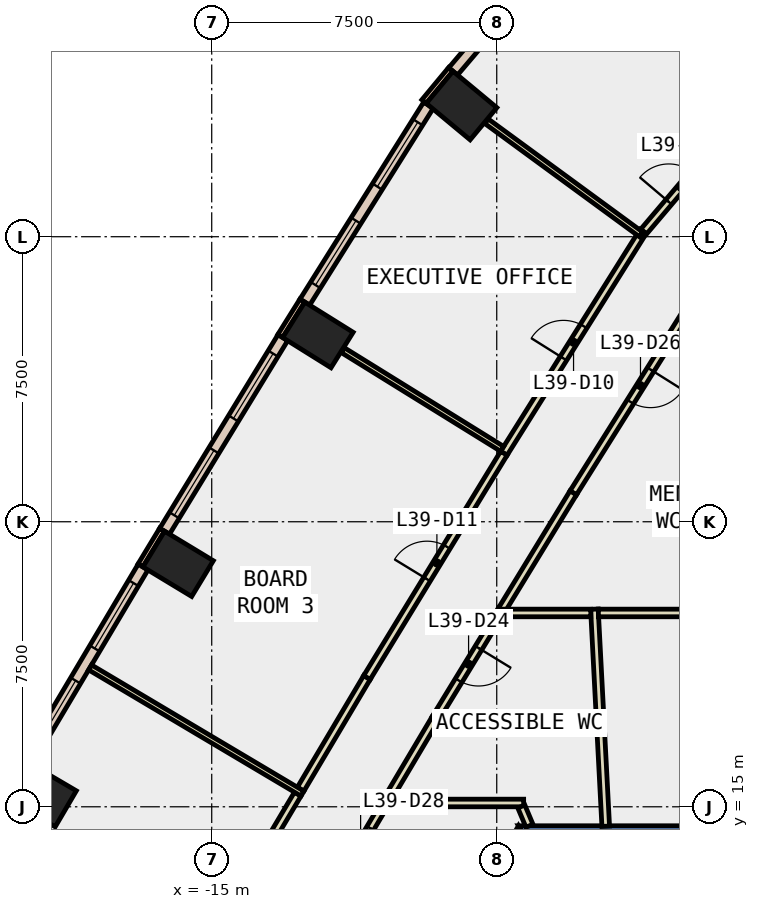
"""IFC4 building model, lengths in metres.
Left out: names, types, materials, properties, quantities, classifications, styles, units other than length and angle.
Written with IfcOpenShell. Run it as: python <this file> out.ifc"""

import sys

from ifc_helpers import new_model, si_unit, direction, frame, frame_2d, origin, origin_2d, place, context, subcontext, project, spatial, polyline, rectangle, outline, extrude, element, fill, save


model = new_model("IFC4")
c1 = context("Model", 3, precision=1e-05, world=origin(), true_north=direction((0.0, 1.0)))
c2 = subcontext(c1, "Body", "Model", "MODEL_VIEW")
j1 = project(units=[si_unit("LENGTHUNIT", "METRE"), si_unit("PLANEANGLEUNIT", "RADIAN")], contexts=[c1])
p1 = place(None, origin())
s1 = spatial("IfcSite", under=j1, at=p1, CompositionType="ELEMENT")
p2 = place(p1, origin())
s2 = spatial("IfcBuilding", under=s1, at=p2, CompositionType="ELEMENT")
p3 = place(p2, frame((0.0, 0.0, 176.0)))
s3 = spatial("IfcBuildingStorey", under=s2, at=p3, CompositionType="ELEMENT", Elevation=176.0)
for number, where, z_axis, x_axis in (
    (1, (-8.426, 33.452, -0.4), (0.0, 0.0, 1.0), (0.639, 0.769, 0.0)),
    (2, (-12.206, 27.416, -0.4), (0.0, 0.0, 1.0), (0.53, 0.848, 0.0)),
    (3, (-15.884, 21.393, -0.4), (0.0, 0.0, 1.0), (0.518, 0.855, 0.0)),
    (4, (-19.488, 15.326, -0.4), (0.0, 0.0, 1.0), (0.506, 0.863, 0.0)),
):
    element("IfcColumn", number, at=place(p3, frame(where, z_axis=z_axis, x_axis=x_axis)), inside=s3, PredefinedType="COLUMN", context=c2, shape_type="SweptSolid", body=[
        extrude(rectangle(XDim=1.1, YDim=1.5, at=origin_2d()), origin(), (0.0, 0.0, 1.0), 4.2),
    ])
p4 = place(p3, frame((0.0, 0.0, -0.4)))
e5 = element("IfcWall", 5, at=p4, inside=s3, PredefinedType="SHEAR", context=c2, shape_type="SweptSolid", body=[
    extrude(outline(polyline([(6.928, 14.5), (-6.928, 14.5), (-6.351, 13.5), (6.351, 13.5), (6.928, 14.5)])), origin(), (0.0, 0.0, 1.0), 4.2),
])
p5 = place(p3, frame((0.0, 0.0, -0.4)))
e6 = element("IfcWall", 6, at=p5, inside=s3, PredefinedType="SHEAR", context=c2, shape_type="SweptSolid", body=[
    extrude(outline(polyline([(-12.267, 5.252), (-11.402, 4.752), (-6.351, 13.5), (-6.928, 14.5), (-12.267, 5.252)])), origin(), (0.0, 0.0, 1.0), 4.2),
])
p6 = place(p3, frame((-8.709, 34.402, 0.0), z_axis=(0.0, 0.0, 1.0), x_axis=(-0.639092407347, -0.769129959676, 0.0)))
e7 = element("IfcWall", 7, at=p6, inside=s3, PredefinedType="STANDARD", context=c2, shape_type="SweptSolid", body=[
    extrude(rectangle(XDim=1.1, YDim=0.15, at=frame_2d((0.55, 0.0))), origin(), (0.0, 0.0, 1.0), 3.8),
])
p7 = place(p3, frame((-12.614, 28.32, 0.0), z_axis=(0.0, 0.0, 1.0), x_axis=(-0.529879262372, -0.848073090782, 0.0)))
e8 = element("IfcWall", 8, at=p7, inside=s3, PredefinedType="STANDARD", context=c2, shape_type="SweptSolid", body=[
    extrude(rectangle(XDim=1.1, YDim=0.15, at=frame_2d((0.55, 0.0))), origin(), (0.0, 0.0, 1.0), 3.8),
])
p8 = place(p3, frame((-16.305, 22.291, 0.0), z_axis=(0.0, 0.0, 1.0), x_axis=(-0.518178754102, -0.855272341888, 0.0)))
e9 = element("IfcWall", 9, at=p8, inside=s3, PredefinedType="STANDARD", context=c2, shape_type="SweptSolid", body=[
    extrude(rectangle(XDim=1.1, YDim=0.15, at=frame_2d((0.55, 0.0))), origin(), (0.0, 0.0, 1.0), 3.8),
])
p9 = place(p3, frame((-5.889, 37.599, 0.0), z_axis=(0.0, 0.0, 1.0), x_axis=(-0.647156077277, -0.76235753531, 0.0)))
e10 = element("IfcWall", 10, at=p9, inside=s3, PredefinedType="STANDARD", context=c2, shape_type="SweptSolid", body=[
    extrude(rectangle(XDim=4.262, YDim=0.3, at=frame_2d((2.131, 0.0))), origin(), (0.0, 0.0, 1.0), 3.8),
])
p10 = place(p9, frame((1.431, 0.0, 0.9)))
e11 = element("IfcOpeningElement", 11, at=p10, cuts=e10, PredefinedType="OPENING", context=c2, shape_type="SweptSolid", body=[
    extrude(rectangle(XDim=1.4, YDim=2.6, at=frame_2d((0.7, 1.3))), frame((0.0, 0.16, 0.0), z_axis=(0.0, -1.0, 0.0), x_axis=(1.0, 0.0, 0.0)), (0.0, 0.0, 1.0), 0.32),
])
p11 = place(p3, frame((-9.296, 33.461, 0.0), z_axis=(0.0, 0.0, 1.0), x_axis=(-0.531816047834, -0.846859900613, 0.0)))
e12 = element("IfcWall", 12, at=p11, inside=s3, PredefinedType="STANDARD", context=c2, shape_type="SweptSolid", body=[
    extrude(rectangle(XDim=6.119, YDim=0.3, at=frame_2d((3.06, 0.0))), origin(), (0.0, 0.0, 1.0), 3.8),
])
p12 = place(p11, frame((0.53, 0.0, 0.9)))
e13 = element("IfcOpeningElement", 13, at=p12, cuts=e12, PredefinedType="OPENING", context=c2, shape_type="SweptSolid", body=[
    extrude(rectangle(XDim=2.0, YDim=2.6, at=frame_2d((1.0, 1.3))), frame((0.0, 0.16, 0.0), z_axis=(0.0, -1.0, 0.0), x_axis=(1.0, 0.0, 0.0)), (0.0, 0.0, 1.0), 0.32),
])
p13 = place(p11, frame((3.589, 0.0, 0.9)))
e14 = element("IfcOpeningElement", 14, at=p13, cuts=e12, PredefinedType="OPENING", context=c2, shape_type="SweptSolid", body=[
    extrude(rectangle(XDim=2.0, YDim=2.6, at=frame_2d((1.0, 1.3))), frame((0.0, 0.16, 0.0), z_axis=(0.0, -1.0, 0.0), x_axis=(1.0, 0.0, 0.0)), (0.0, 0.0, 1.0), 0.32),
])
p14 = place(p3, frame((-13.128, 27.345, 0.0), z_axis=(0.0, 0.0, 1.0), x_axis=(-0.521263083766, -0.8533960379, 0.0)))
e15 = element("IfcWall", 15, at=p14, inside=s3, PredefinedType="STANDARD", context=c2, shape_type="SweptSolid", body=[
    extrude(rectangle(XDim=5.97, YDim=0.3, at=frame_2d((2.985, 0.0))), origin(), (0.0, 0.0, 1.0), 3.8),
])
p15 = place(p14, frame((0.493, 0.0, 0.9)))
e16 = element("IfcOpeningElement", 16, at=p15, cuts=e15, PredefinedType="OPENING", context=c2, shape_type="SweptSolid", body=[
    extrude(rectangle(XDim=2.0, YDim=2.6, at=frame_2d((1.0, 1.3))), frame((0.0, 0.16, 0.0), z_axis=(0.0, -1.0, 0.0), x_axis=(1.0, 0.0, 0.0)), (0.0, 0.0, 1.0), 0.32),
])
p16 = place(p14, frame((3.478, 0.0, 0.9)))
e17 = element("IfcOpeningElement", 17, at=p16, cuts=e15, PredefinedType="OPENING", context=c2, shape_type="SweptSolid", body=[
    extrude(rectangle(XDim=2.0, YDim=2.6, at=frame_2d((1.0, 1.3))), frame((0.0, 0.16, 0.0), z_axis=(0.0, -1.0, 0.0), x_axis=(1.0, 0.0, 0.0)), (0.0, 0.0, 1.0), 0.32),
])
p17 = place(p3, frame((-16.806, 21.309, 0.0), z_axis=(0.0, 0.0, 1.0), x_axis=(-0.510653096173, -0.859786842984, 0.0)))
e18 = element("IfcWall", 18, at=p17, inside=s3, PredefinedType="STANDARD", context=c2, shape_type="SweptSolid", body=[
    extrude(rectangle(XDim=5.969, YDim=0.3, at=frame_2d((2.984, 0.0))), origin(), (0.0, 0.0, 1.0), 3.8),
])
p18 = place(p17, frame((0.492, 0.0, 0.9)))
e19 = element("IfcOpeningElement", 19, at=p18, cuts=e18, PredefinedType="OPENING", context=c2, shape_type="SweptSolid", body=[
    extrude(rectangle(XDim=2.0, YDim=2.6, at=frame_2d((1.0, 1.3))), frame((0.0, 0.16, 0.0), z_axis=(0.0, -1.0, 0.0), x_axis=(1.0, 0.0, 0.0)), (0.0, 0.0, 1.0), 0.32),
])
p19 = place(p17, frame((3.477, 0.0, 0.9)))
e20 = element("IfcOpeningElement", 20, at=p19, cuts=e18, PredefinedType="OPENING", context=c2, shape_type="SweptSolid", body=[
    extrude(rectangle(XDim=2.0, YDim=2.6, at=frame_2d((1.0, 1.3))), frame((0.0, 0.16, 0.0), z_axis=(0.0, -1.0, 0.0), x_axis=(1.0, 0.0, 0.0)), (0.0, 0.0, 1.0), 0.32),
])
p20 = place(p3, frame((-10.484, 15.014, 0.0), z_axis=(0.0, 0.0, 1.0), x_axis=(-0.510627855782, -0.859801833506, 0.0)))
e21 = element("IfcWall", 21, at=p20, inside=s3, PredefinedType="PARTITIONING", context=c2, shape_type="SweptSolid", body=[
    extrude(rectangle(XDim=2.342, YDim=0.2, at=frame_2d((1.171, 0.0))), origin(), (0.0, 0.0, 1.0), 3.75),
])
p21 = place(p20, frame((0.671, 0.0, 0.0)))
e22 = element("IfcOpeningElement", 22, at=p21, cuts=e21, PredefinedType="OPENING", context=c2, shape_type="SweptSolid", body=[
    extrude(rectangle(XDim=1.0, YDim=2.1, at=frame_2d((0.5, 1.05))), frame((0.0, 0.11, 0.0), z_axis=(0.0, -1.0, 0.0), x_axis=(1.0, 0.0, 0.0)), (0.0, 0.0, 1.0), 0.22),
])
p22 = place(p3, frame((-7.365, 20.185, 0.0), z_axis=(0.0, 0.0, 1.0), x_axis=(-0.521352973407, -0.853341125881, 0.0)))
e23 = element("IfcWall", 23, at=p22, inside=s3, PredefinedType="PARTITIONING", context=c2, shape_type="SweptSolid", body=[
    extrude(rectangle(XDim=3.359, YDim=0.2, at=frame_2d((1.679, 0.0))), origin(), (0.0, 0.0, 1.0), 3.75),
])
p23 = place(p22, frame((1.18, 0.0, 0.0)))
e24 = element("IfcOpeningElement", 24, at=p23, cuts=e23, PredefinedType="OPENING", context=c2, shape_type="SweptSolid", body=[
    extrude(rectangle(XDim=1.0, YDim=2.1, at=frame_2d((0.5, 1.05))), frame((0.0, 0.11, 0.0), z_axis=(0.0, -1.0, 0.0), x_axis=(1.0, 0.0, 0.0)), (0.0, 0.0, 1.0), 0.22),
])
p24 = place(p3, frame((-9.116, 17.319, 0.0), z_axis=(0.0, 0.0, 1.0), x_axis=(-0.510422773569, -0.859923596735, 0.0)))
e25 = element("IfcWall", 25, at=p24, inside=s3, PredefinedType="PARTITIONING", context=c2, shape_type="SweptSolid", body=[
    extrude(rectangle(XDim=2.48, YDim=0.2, at=frame_2d((1.24, 0.0))), origin(), (0.0, 0.0, 1.0), 3.75),
])
p25 = place(p3, frame((-1.948, 28.898, 0.0), z_axis=(0.0, 0.0, 1.0), x_axis=(-0.531656179122, -0.846960274866, 0.0)))
e26 = element("IfcWall", 26, at=p25, inside=s3, PredefinedType="PARTITIONING", context=c2, shape_type="SweptSolid", body=[
    extrude(rectangle(XDim=6.657, YDim=0.2, at=frame_2d((3.328, 0.0))), origin(), (0.0, 0.0, 1.0), 3.75),
])
p26 = place(p25, frame((2.828, 0.0, 0.0)))
e27 = element("IfcOpeningElement", 27, at=p26, cuts=e26, PredefinedType="OPENING", context=c2, shape_type="SweptSolid", body=[
    extrude(rectangle(XDim=1.0, YDim=2.1, at=frame_2d((0.5, 1.05))), frame((0.0, 0.11, 0.0), z_axis=(0.0, -1.0, 0.0), x_axis=(1.0, 0.0, 0.0)), (0.0, 0.0, 1.0), 0.22),
])
p27 = place(p3, frame((-5.487, 23.26, 0.0), z_axis=(0.0, 0.0, 1.0), x_axis=(-0.521206053955, -0.853430869679, 0.0)))
e28 = element("IfcWall", 28, at=p27, inside=s3, PredefinedType="PARTITIONING", context=c2, shape_type="SweptSolid", body=[
    extrude(rectangle(XDim=3.603, YDim=0.2, at=frame_2d((1.802, 0.0))), origin(), (0.0, 0.0, 1.0), 3.75),
])
p28 = place(p3, frame((-3.634, 30.134, 0.0), z_axis=(0.0, 0.0, 1.0), x_axis=(0.647148242723, 0.762364185899, 0.0)))
e29 = element("IfcWall", 29, at=p28, inside=s3, PredefinedType="PARTITIONING", context=c2, shape_type="SweptSolid", body=[
    extrude(rectangle(XDim=3.047, YDim=0.2, at=frame_2d((1.523, 0.0))), origin(), (0.0, 0.0, 1.0), 3.75),
])
p29 = place(p28, frame((1.024, 0.0, 0.0)))
e30 = element("IfcOpeningElement", 30, at=p29, cuts=e29, PredefinedType="OPENING", context=c2, shape_type="SweptSolid", body=[
    extrude(rectangle(XDim=1.0, YDim=2.1, at=frame_2d((0.5, 1.05))), frame((0.0, 0.11, 0.0), z_axis=(0.0, -1.0, 0.0), x_axis=(1.0, 0.0, 0.0)), (0.0, 0.0, 1.0), 0.22),
])
p30 = place(p3, frame((-7.312, 24.302, 0.0), z_axis=(0.0, 0.0, 1.0), x_axis=(0.53166241737, 0.846956358944, 0.0)))
e31 = element("IfcWall", 31, at=p30, inside=s3, PredefinedType="PARTITIONING", context=c2, shape_type="SweptSolid", body=[
    extrude(rectangle(XDim=6.895, YDim=0.2, at=frame_2d((3.448, 0.0))), origin(), (0.0, 0.0, 1.0), 3.75),
])
p31 = place(p30, frame((2.948, 0.0, 0.0)))
e32 = element("IfcOpeningElement", 32, at=p31, cuts=e31, PredefinedType="OPENING", context=c2, shape_type="SweptSolid", body=[
    extrude(rectangle(XDim=1.0, YDim=2.1, at=frame_2d((0.5, 1.05))), frame((0.0, 0.11, 0.0), z_axis=(0.0, -1.0, 0.0), x_axis=(1.0, 0.0, 0.0)), (0.0, 0.0, 1.0), 0.22),
])
p32 = place(p3, frame((-12.66, 15.463, 0.0), z_axis=(0.0, 0.0, 1.0), x_axis=(0.510477693133, 0.85989099589, 0.0)))
e33 = element("IfcWall", 33, at=p32, inside=s3, PredefinedType="PARTITIONING", context=c2, shape_type="SweptSolid", body=[
    extrude(rectangle(XDim=3.418, YDim=0.2, at=frame_2d((1.709, 0.0))), origin(), (0.0, 0.0, 1.0), 3.75),
])
p33 = place(p3, frame((-10.915, 18.402, 0.0), z_axis=(0.0, 0.0, 1.0), x_axis=(0.521189997761, 0.853440675287, 0.0)))
e34 = element("IfcWall", 34, at=p33, inside=s3, PredefinedType="PARTITIONING", context=c2, shape_type="SweptSolid", body=[
    extrude(rectangle(XDim=6.913, YDim=0.2, at=frame_2d((3.457, 0.0))), origin(), (0.0, 0.0, 1.0), 3.75),
])
p34 = place(p33, frame((3.031, 0.0, 0.0)))
e35 = element("IfcOpeningElement", 35, at=p34, cuts=e34, PredefinedType="OPENING", context=c2, shape_type="SweptSolid", body=[
    extrude(rectangle(XDim=1.0, YDim=2.1, at=frame_2d((0.5, 1.05))), frame((0.0, 0.11, 0.0), z_axis=(0.0, -1.0, 0.0), x_axis=(1.0, 0.0, 0.0)), (0.0, 0.0, 1.0), 0.22),
])
p35 = place(p3, frame((-14.482, 12.395, 0.0), z_axis=(0.0, 0.0, 1.0), x_axis=(0.51050904729, 0.859872381598, 0.0)))
e36 = element("IfcWall", 36, at=p35, inside=s3, PredefinedType="PARTITIONING", context=c2, shape_type="SweptSolid", body=[
    extrude(rectangle(XDim=3.418, YDim=0.2, at=frame_2d((1.709, 0.0))), origin(), (0.0, 0.0, 1.0), 3.75),
])
p36 = place(p3, frame((-6.792, 15.1, 0.0), z_axis=(0.0, 0.0, 1.0), x_axis=(-1.0, 0.0, 0.0)))
e37 = element("IfcWall", 37, at=p36, inside=s3, PredefinedType="PARTITIONING", context=c2, shape_type="SweptSolid", body=[
    extrude(rectangle(XDim=3.741, YDim=0.2, at=frame_2d((1.871, 0.0))), origin(), (0.0, 0.0, 1.0), 3.75),
])
p37 = place(p3, frame((-6.639, 14.5, 0.0), z_axis=(0.0, 0.0, 1.0), x_axis=(-0.388353930402, 0.921510295516, 0.0)))
e38 = element("IfcWall", 38, at=p37, inside=s3, PredefinedType="PARTITIONING", context=c2, shape_type="SweptSolid", body=[
    extrude(rectangle(XDim=0.551, YDim=0.2, at=frame_2d((0.276, 0.0))), origin(), (0.0, 0.0, 1.0), 3.75),
])
p38 = place(p3, frame((-4.632, 14.488, 0.0), z_axis=(0.0, 0.0, 1.0), x_axis=(-0.052074913706, 0.998643181203, 0.0)))
e39 = element("IfcWall", 39, at=p38, inside=s3, PredefinedType="PARTITIONING", context=c2, shape_type="SweptSolid", body=[
    extrude(rectangle(XDim=5.72, YDim=0.2, at=frame_2d((2.86, 0.0))), origin(), (0.0, 0.0, 1.0), 3.75),
])
p39 = place(p3, frame((-4.825, 20.1, 0.0), z_axis=(0.0, 0.0, 1.0), x_axis=(1.0, 0.0, 0.0)))
e40 = element("IfcWall", 40, at=p39, inside=s3, PredefinedType="PARTITIONING", context=c2, shape_type="SweptSolid", body=[
    extrude(rectangle(XDim=4.425, YDim=0.2, at=frame_2d((2.212, 0.0))), origin(), (0.0, 0.0, 1.0), 3.75),
])
p40 = place(p3, frame((-7.317, 20.1, 0.0), z_axis=(0.0, 0.0, 1.0), x_axis=(1.0, 0.0, 0.0)))
e41 = element("IfcWall", 41, at=p40, inside=s3, PredefinedType="PARTITIONING", context=c2, shape_type="SweptSolid", body=[
    extrude(rectangle(XDim=2.292, YDim=0.2, at=frame_2d((1.146, 0.0))), origin(), (0.0, 0.0, 1.0), 3.75),
])
p41 = place(p3, frame((-3.699, 30.058, 0.0), z_axis=(0.0, 0.0, 1.0), x_axis=(-0.806852521394, 0.59075291681, 0.0)))
e42 = element("IfcWall", 42, at=p41, inside=s3, PredefinedType="PARTITIONING", context=c2, shape_type="SweptSolid", body=[
    extrude(rectangle(XDim=5.044, YDim=0.15, at=frame_2d((2.522, 0.0))), origin(), (0.0, 0.0, 1.0), 3.75),
])
p42 = place(p3, frame((-7.358, 24.418, 0.0), z_axis=(0.0, 0.0, 1.0), x_axis=(-0.850136365231, 0.526562589358, 0.0)))
e43 = element("IfcWall", 43, at=p42, inside=s3, PredefinedType="PARTITIONING", context=c2, shape_type="SweptSolid", body=[
    extrude(rectangle(XDim=4.93, YDim=0.15, at=frame_2d((2.465, 0.0))), origin(), (0.0, 0.0, 1.0), 3.75),
])
p43 = place(p3, frame((-12.613, 15.348, 0.0), z_axis=(0.0, 0.0, 1.0), x_axis=(-0.85976815765, 0.510684555368, 0.0)))
e44 = element("IfcWall", 44, at=p43, inside=s3, PredefinedType="PARTITIONING", context=c2, shape_type="SweptSolid", body=[
    extrude(rectangle(XDim=6.499, YDim=0.15, at=frame_2d((3.25, 0.0))), origin(), (0.0, 0.0, 1.0), 3.75),
])
p44 = place(p12, origin())
e45 = element("IfcWindow", 45, at=p44, inside=s3, PartitioningType="SINGLE_PANEL", PredefinedType="WINDOW", context=c2, shape_type="SweptSolid", body=[
    extrude(rectangle(XDim=2.0, YDim=2.6, at=frame_2d((1.0, 1.3))), frame((0.0, 0.03, 0.0), z_axis=(0.0, -1.0, 0.0), x_axis=(1.0, 0.0, 0.0)), (0.0, 0.0, 1.0), 0.06),
])
fill(e13, e45)
p45 = place(p13, origin())
e46 = element("IfcWindow", 46, at=p45, inside=s3, PartitioningType="SINGLE_PANEL", PredefinedType="WINDOW", context=c2, shape_type="SweptSolid", body=[
    extrude(rectangle(XDim=2.0, YDim=2.6, at=frame_2d((1.0, 1.3))), frame((0.0, 0.03, 0.0), z_axis=(0.0, -1.0, 0.0), x_axis=(1.0, 0.0, 0.0)), (0.0, 0.0, 1.0), 0.06),
])
fill(e14, e46)
p46 = place(p15, origin())
e47 = element("IfcWindow", 47, at=p46, inside=s3, PartitioningType="SINGLE_PANEL", PredefinedType="WINDOW", context=c2, shape_type="SweptSolid", body=[
    extrude(rectangle(XDim=2.0, YDim=2.6, at=frame_2d((1.0, 1.3))), frame((0.0, 0.03, 0.0), z_axis=(0.0, -1.0, 0.0), x_axis=(1.0, 0.0, 0.0)), (0.0, 0.0, 1.0), 0.06),
])
fill(e16, e47)
p47 = place(p16, origin())
e48 = element("IfcWindow", 48, at=p47, inside=s3, PartitioningType="SINGLE_PANEL", PredefinedType="WINDOW", context=c2, shape_type="SweptSolid", body=[
    extrude(rectangle(XDim=2.0, YDim=2.6, at=frame_2d((1.0, 1.3))), frame((0.0, 0.03, 0.0), z_axis=(0.0, -1.0, 0.0), x_axis=(1.0, 0.0, 0.0)), (0.0, 0.0, 1.0), 0.06),
])
fill(e17, e48)
p48 = place(p18, origin())
e49 = element("IfcWindow", 49, at=p48, inside=s3, PartitioningType="SINGLE_PANEL", PredefinedType="WINDOW", context=c2, shape_type="SweptSolid", body=[
    extrude(rectangle(XDim=2.0, YDim=2.6, at=frame_2d((1.0, 1.3))), frame((0.0, 0.03, 0.0), z_axis=(0.0, -1.0, 0.0), x_axis=(1.0, 0.0, 0.0)), (0.0, 0.0, 1.0), 0.06),
])
fill(e19, e49)
p49 = place(p19, origin())
e50 = element("IfcWindow", 50, at=p49, inside=s3, PartitioningType="SINGLE_PANEL", PredefinedType="WINDOW", context=c2, shape_type="SweptSolid", body=[
    extrude(rectangle(XDim=2.0, YDim=2.6, at=frame_2d((1.0, 1.3))), frame((0.0, 0.03, 0.0), z_axis=(0.0, -1.0, 0.0), x_axis=(1.0, 0.0, 0.0)), (0.0, 0.0, 1.0), 0.06),
])
fill(e20, e50)
p50 = place(p29, origin())
e51 = element("IfcDoor", 51, at=p50, inside=s3, OperationType="SINGLE_SWING_LEFT", PredefinedType="DOOR", context=c2, shape_type="SweptSolid", body=[
    extrude(rectangle(XDim=1.0, YDim=2.1, at=frame_2d((0.5, 1.05))), frame((0.0, 0.025, 0.0), z_axis=(0.0, -1.0, 0.0), x_axis=(1.0, 0.0, 0.0)), (0.0, 0.0, 1.0), 0.05),
])
fill(e30, e51)
p51 = place(p31, origin())
e52 = element("IfcDoor", 52, at=p51, inside=s3, OperationType="SINGLE_SWING_LEFT", PredefinedType="DOOR", context=c2, shape_type="SweptSolid", body=[
    extrude(rectangle(XDim=1.0, YDim=2.1, at=frame_2d((0.5, 1.05))), frame((0.0, 0.025, 0.0), z_axis=(0.0, -1.0, 0.0), x_axis=(1.0, 0.0, 0.0)), (0.0, 0.0, 1.0), 0.05),
])
fill(e32, e52)
p52 = place(p34, origin())
e53 = element("IfcDoor", 53, at=p52, inside=s3, OperationType="SINGLE_SWING_RIGHT", PredefinedType="DOOR", context=c2, shape_type="SweptSolid", body=[
    extrude(rectangle(XDim=1.0, YDim=2.1, at=frame_2d((0.5, 1.05))), frame((0.0, 0.025, 0.0), z_axis=(0.0, -1.0, 0.0), x_axis=(1.0, 0.0, 0.0)), (0.0, 0.0, 1.0), 0.05),
])
fill(e35, e53)
p53 = place(p23, origin())
e54 = element("IfcDoor", 54, at=p53, inside=s3, OperationType="SINGLE_SWING_LEFT", PredefinedType="DOOR", context=c2, shape_type="SweptSolid", body=[
    extrude(rectangle(XDim=1.0, YDim=2.1, at=frame_2d((0.5, 1.05))), frame((0.0, 0.025, 0.0), z_axis=(0.0, -1.0, 0.0), x_axis=(1.0, 0.0, 0.0)), (0.0, 0.0, 1.0), 0.05),
])
fill(e24, e54)
p54 = place(p26, origin())
e55 = element("IfcDoor", 55, at=p54, inside=s3, OperationType="SINGLE_SWING_LEFT", PredefinedType="DOOR", context=c2, shape_type="SweptSolid", body=[
    extrude(rectangle(XDim=1.0, YDim=2.1, at=frame_2d((0.5, 1.05))), frame((0.0, 0.025, 0.0), z_axis=(0.0, -1.0, 0.0), x_axis=(1.0, 0.0, 0.0)), (0.0, 0.0, 1.0), 0.05),
])
fill(e27, e55)
p55 = place(p21, origin())
e56 = element("IfcDoor", 56, at=p55, inside=s3, OperationType="SINGLE_SWING_LEFT", PredefinedType="DOOR", context=c2, shape_type="SweptSolid", body=[
    extrude(rectangle(XDim=1.0, YDim=2.1, at=frame_2d((0.5, 1.05))), frame((0.0, 0.025, 0.0), z_axis=(0.0, -1.0, 0.0), x_axis=(1.0, 0.0, 0.0)), (0.0, 0.0, 1.0), 0.05),
])
fill(e22, e56)
save(model, sys.argv[1])
